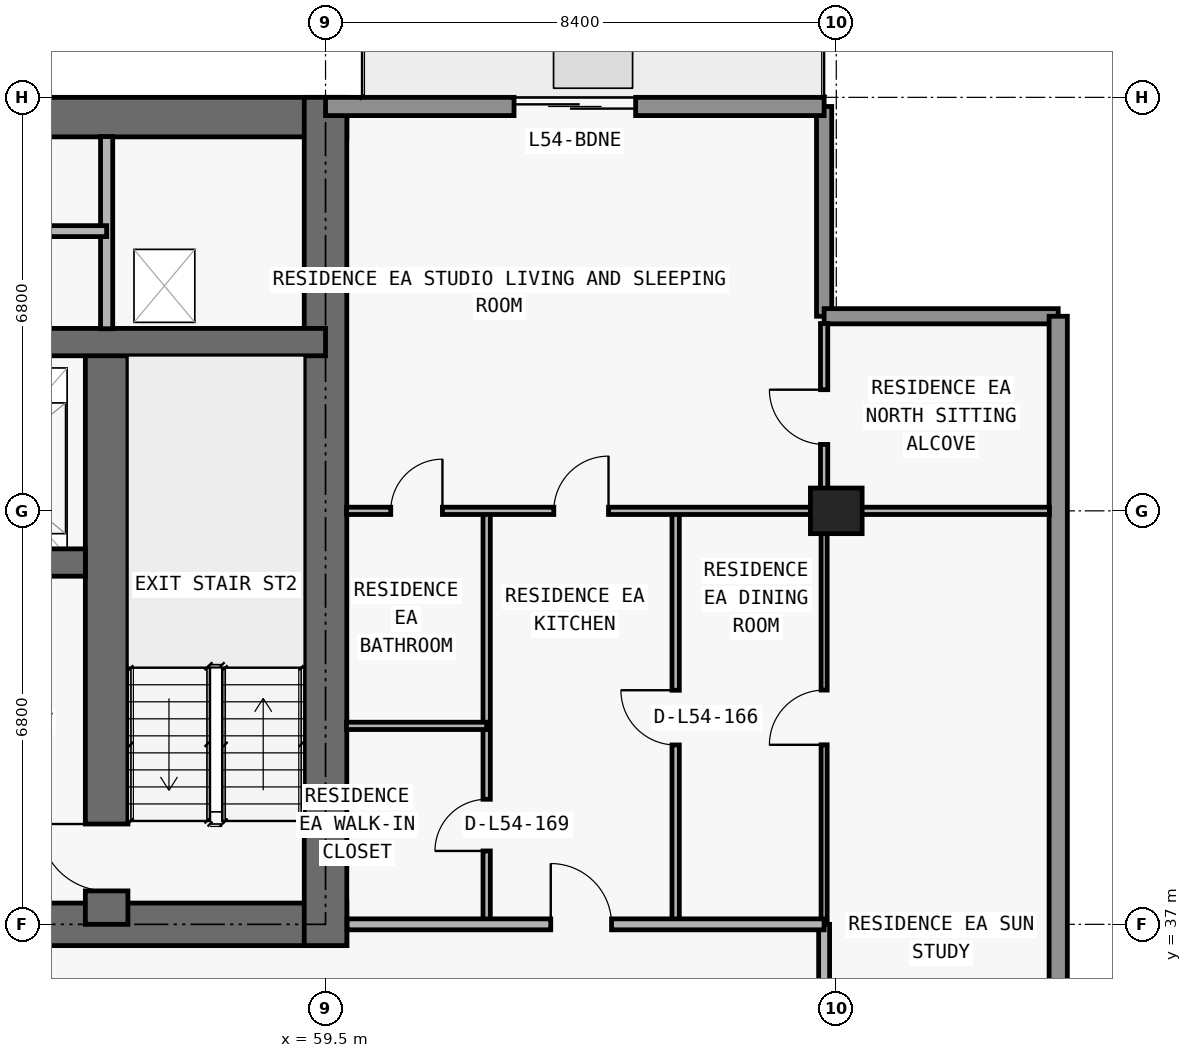
"""IFC4 building model, lengths in metres.
Left out: names, types, materials, properties, quantities, classifications, styles, units other than length and angle.
Written with IfcOpenShell. Run it as: python <this file> out.ifc"""

import sys

from ifc_helpers import new_model, si_unit, direction, frame, frame_2d, origin, origin_2d, place, context, subcontext, project, spatial, rectangle, extrude, element, fill, save


model = new_model("IFC4")
c1 = context("Model", 3, precision=1e-05, world=origin(), true_north=direction((0.0, 1.0)))
c2 = subcontext(c1, "Body", "Model", "MODEL_VIEW")
j1 = project(units=[si_unit("LENGTHUNIT", "METRE"), si_unit("PLANEANGLEUNIT", "RADIAN")], contexts=[c1])
p1 = place(None, origin())
s1 = spatial("IfcSite", under=j1, at=p1, CompositionType="ELEMENT")
p2 = place(p1, origin())
s2 = spatial("IfcBuilding", under=s1, at=p2, CompositionType="ELEMENT")
p3 = place(p2, frame((0.0, 0.0, 195.0)))
s3 = spatial("IfcBuildingStorey", under=s2, at=p3, CompositionType="ELEMENT", Elevation=195.0)
p4 = place(p3, frame((67.9, 43.8, 0.0), z_axis=(0.0, 0.0, 1.0), x_axis=(1.0, 0.0, 0.0)))
e1 = element("IfcColumn", 1, at=p4, inside=s3, PredefinedType="COLUMN", context=c2, shape_type="SweptSolid", body=[
    extrude(rectangle(XDim=0.85, YDim=0.75, at=origin_2d()), origin(), (0.0, 0.0, 1.0), 3.05),
])
p5 = place(p3, frame((17.95, 37.0, 0.0), z_axis=(0.0, 0.0, 1.0), x_axis=(1.0, 0.0, 0.0)))
e2 = element("IfcWall", 2, at=p5, inside=s3, PredefinedType="SHEAR", context=c2, shape_type="SweptSolid", body=[
    extrude(rectangle(XDim=41.9, YDim=0.7, at=frame_2d((20.95, 0.0))), origin(), (0.0, 0.0, 1.0), 3.05),
])
p6 = place(p5, frame((14.35, 0.0, 0.0)))
e3 = element("IfcOpeningElement", 3, at=p6, cuts=e2, PredefinedType="OPENING", context=c2, shape_type="SweptSolid", body=[
    extrude(rectangle(XDim=1.1, YDim=2.15, at=frame_2d((0.55, 1.075))), frame((0.0, 0.36, 0.0), z_axis=(0.0, -1.0, 0.0), x_axis=(1.0, 0.0, 0.0)), (0.0, 0.0, 1.0), 0.72),
])
p7 = place(p5, frame((6.2, 0.0, 0.0)))
e4 = element("IfcOpeningElement", 4, at=p7, cuts=e2, PredefinedType="OPENING", context=c2, shape_type="SweptSolid", body=[
    extrude(rectangle(XDim=1.05, YDim=2.15, at=frame_2d((0.525, 1.075))), frame((0.0, 0.36, 0.0), z_axis=(0.0, -1.0, 0.0), x_axis=(1.0, 0.0, 0.0)), (0.0, 0.0, 1.0), 0.72),
])
p8 = place(p5, frame((34.7, 0.0, 0.0)))
e5 = element("IfcOpeningElement", 5, at=p8, cuts=e2, PredefinedType="OPENING", context=c2, shape_type="SweptSolid", body=[
    extrude(rectangle(XDim=1.05, YDim=2.15, at=frame_2d((0.525, 1.075))), frame((0.0, 0.36, 0.0), z_axis=(0.0, -1.0, 0.0), x_axis=(1.0, 0.0, 0.0)), (0.0, 0.0, 1.0), 0.72),
])
p9 = place(p5, frame((10.812, 0.0, 0.0)))
e6 = element("IfcOpeningElement", 6, at=p9, cuts=e2, PredefinedType="OPENING", context=c2, shape_type="SweptSolid", body=[
    extrude(rectangle(XDim=1.05, YDim=2.15, at=frame_2d((0.525, 1.075))), frame((0.0, 0.36, 0.0), z_axis=(0.0, -1.0, 0.0), x_axis=(1.0, 0.0, 0.0)), (0.0, 0.0, 1.0), 0.72),
])
p10 = place(p5, frame((24.05, 0.0, 0.0)))
e7 = element("IfcOpeningElement", 7, at=p10, cuts=e2, PredefinedType="OPENING", context=c2, shape_type="SweptSolid", body=[
    extrude(rectangle(XDim=1.05, YDim=2.15, at=frame_2d((0.525, 1.075))), frame((0.0, 0.36, 0.0), z_axis=(0.0, -1.0, 0.0), x_axis=(1.0, 0.0, 0.0)), (0.0, 0.0, 1.0), 0.72),
])
p11 = place(p3, frame((17.95, 50.275, 0.0), z_axis=(0.0, 0.0, 1.0), x_axis=(1.0, 0.0, 0.0)))
e8 = element("IfcWall", 8, at=p11, inside=s3, PredefinedType="SHEAR", context=c2, shape_type="SweptSolid", body=[
    extrude(rectangle(XDim=41.9, YDim=0.65, at=frame_2d((20.95, 0.0))), origin(), (0.0, 0.0, 1.0), 3.05),
])
p12 = place(p3, frame((59.5, 36.65, 0.0), z_axis=(0.0, 0.0, 1.0), x_axis=(0.0, 1.0, 0.0)))
e9 = element("IfcWall", 9, at=p12, inside=s3, PredefinedType="SHEAR", context=c2, shape_type="SweptSolid", body=[
    extrude(rectangle(XDim=13.95, YDim=0.7, at=frame_2d((6.975, 0.0))), origin(), (0.0, 0.0, 1.0), 3.05),
])
p13 = place(p3, frame((55.9, 37.0, 0.0), z_axis=(0.0, 0.0, 1.0), x_axis=(0.0, 1.0, 0.0)))
e10 = element("IfcWall", 10, at=p13, inside=s3, PredefinedType="SHEAR", context=c2, shape_type="SweptSolid", body=[
    extrude(rectangle(XDim=9.575, YDim=0.7, at=frame_2d((4.788, 0.0))), origin(), (0.0, 0.0, 1.0), 3.05),
])
p14 = place(p13, frame((0.55, 0.0, 0.0)))
e11 = element("IfcOpeningElement", 11, at=p14, cuts=e10, PredefinedType="OPENING", context=c2, shape_type="SweptSolid", body=[
    extrude(rectangle(XDim=1.1, YDim=2.15, at=frame_2d((0.55, 1.075))), frame((0.0, 0.36, 0.0), z_axis=(0.0, -1.0, 0.0), x_axis=(1.0, 0.0, 0.0)), (0.0, 0.0, 1.0), 0.72),
])
p15 = place(p3, frame((22.25, 42.95, 0.0), z_axis=(0.0, 0.0, 1.0), x_axis=(1.0, 0.0, 0.0)))
e12 = element("IfcWall", 12, at=p15, inside=s3, PredefinedType="SHEAR", context=c2, shape_type="SweptSolid", body=[
    extrude(rectangle(XDim=33.3, YDim=0.45, at=frame_2d((16.65, 0.0))), origin(), (0.0, 0.0, 1.0), 3.05),
])
p16 = place(p15, frame((1.05, 0.0, 0.0)))
e13 = element("IfcOpeningElement", 13, at=p16, cuts=e12, PredefinedType="OPENING", context=c2, shape_type="SweptSolid", body=[
    extrude(rectangle(XDim=1.2, YDim=2.2, at=frame_2d((0.6, 1.1))), frame((0.0, 0.235, 0.0), z_axis=(0.0, -1.0, 0.0), x_axis=(1.0, 0.0, 0.0)), (0.0, 0.0, 1.0), 0.47),
])
p17 = place(p15, frame((31.05, 0.0, 0.0)))
e14 = element("IfcOpeningElement", 14, at=p17, cuts=e12, PredefinedType="OPENING", context=c2, shape_type="SweptSolid", body=[
    extrude(rectangle(XDim=1.2, YDim=2.2, at=frame_2d((0.6, 1.1))), frame((0.0, 0.235, 0.0), z_axis=(0.0, -1.0, 0.0), x_axis=(1.0, 0.0, 0.0)), (0.0, 0.0, 1.0), 0.47),
])
p18 = place(p15, frame((26.45, 0.0, 0.0)))
e15 = element("IfcOpeningElement", 15, at=p18, cuts=e12, PredefinedType="OPENING", context=c2, shape_type="SweptSolid", body=[
    extrude(rectangle(XDim=1.1, YDim=2.2, at=frame_2d((0.55, 1.1))), frame((0.0, 0.235, 0.0), z_axis=(0.0, -1.0, 0.0), x_axis=(1.0, 0.0, 0.0)), (0.0, 0.0, 1.0), 0.47),
])
p19 = place(p15, frame((5.95, 0.0, 0.0)))
e16 = element("IfcOpeningElement", 16, at=p19, cuts=e12, PredefinedType="OPENING", context=c2, shape_type="SweptSolid", body=[
    extrude(rectangle(XDim=1.1, YDim=2.2, at=frame_2d((0.55, 1.1))), frame((0.0, 0.235, 0.0), z_axis=(0.0, -1.0, 0.0), x_axis=(1.0, 0.0, 0.0)), (0.0, 0.0, 1.0), 0.47),
])
p20 = place(p15, frame((3.625, 0.0, 0.0)))
e17 = element("IfcOpeningElement", 17, at=p20, cuts=e12, PredefinedType="OPENING", context=c2, shape_type="SweptSolid", body=[
    extrude(rectangle(XDim=1.05, YDim=2.15, at=frame_2d((0.525, 1.075))), frame((0.0, 0.235, 0.0), z_axis=(0.0, -1.0, 0.0), x_axis=(1.0, 0.0, 0.0)), (0.0, 0.0, 1.0), 0.47),
])
p21 = place(p15, frame((28.675, 0.0, 0.0)))
e18 = element("IfcOpeningElement", 18, at=p21, cuts=e12, PredefinedType="OPENING", context=c2, shape_type="SweptSolid", body=[
    extrude(rectangle(XDim=1.05, YDim=2.15, at=frame_2d((0.525, 1.075))), frame((0.0, 0.235, 0.0), z_axis=(0.0, -1.0, 0.0), x_axis=(1.0, 0.0, 0.0)), (0.0, 0.0, 1.0), 0.47),
])
p22 = place(p15, frame((15.225, 0.0, 0.0)))
e19 = element("IfcOpeningElement", 19, at=p22, cuts=e12, PredefinedType="OPENING", context=c2, shape_type="SweptSolid", body=[
    extrude(rectangle(XDim=1.0, YDim=2.2, at=frame_2d((0.5, 1.1))), frame((0.0, 0.235, 0.0), z_axis=(0.0, -1.0, 0.0), x_axis=(1.0, 0.0, 0.0)), (0.0, 0.0, 1.0), 0.47),
])
p23 = place(p15, frame((21.975, 0.0, 0.0)))
e20 = element("IfcOpeningElement", 20, at=p23, cuts=e12, PredefinedType="OPENING", context=c2, shape_type="SweptSolid", body=[
    extrude(rectangle(XDim=1.0, YDim=2.2, at=frame_2d((0.5, 1.1))), frame((0.0, 0.235, 0.0), z_axis=(0.0, -1.0, 0.0), x_axis=(1.0, 0.0, 0.0)), (0.0, 0.0, 1.0), 0.47),
])
p24 = place(p3, frame((18.3, 46.575, 0.0), z_axis=(0.0, 0.0, 1.0), x_axis=(1.0, 0.0, 0.0)))
e21 = element("IfcWall", 21, at=p24, inside=s3, PredefinedType="SHEAR", context=c2, shape_type="SweptSolid", body=[
    extrude(rectangle(XDim=41.2, YDim=0.45, at=frame_2d((20.6, 0.0))), origin(), (0.0, 0.0, 1.0), 3.05),
])
p25 = place(p24, frame((7.575, 0.0, 0.0)))
e22 = element("IfcOpeningElement", 22, at=p25, cuts=e21, PredefinedType="OPENING", context=c2, shape_type="SweptSolid", body=[
    extrude(rectangle(XDim=1.05, YDim=2.15, at=frame_2d((0.525, 1.075))), frame((0.0, 0.235, 0.0), z_axis=(0.0, -1.0, 0.0), x_axis=(1.0, 0.0, 0.0)), (0.0, 0.0, 1.0), 0.47),
])
p26 = place(p24, frame((32.625, 0.0, 0.0)))
e23 = element("IfcOpeningElement", 23, at=p26, cuts=e21, PredefinedType="OPENING", context=c2, shape_type="SweptSolid", body=[
    extrude(rectangle(XDim=1.05, YDim=2.15, at=frame_2d((0.525, 1.075))), frame((0.0, 0.235, 0.0), z_axis=(0.0, -1.0, 0.0), x_axis=(1.0, 0.0, 0.0)), (0.0, 0.0, 1.0), 0.47),
])
p27 = place(p3, frame((67.7, 50.45, 0.0), z_axis=(0.0, 0.0, 1.0), x_axis=(0.0, -1.0, 0.0)))
e24 = element("IfcWall", 24, at=p27, inside=s3, PredefinedType="ELEMENTEDWALL", context=c2, shape_type="SweptSolid", body=[
    extrude(rectangle(XDim=3.45, YDim=0.25, at=frame_2d((1.725, 0.0))), origin(), (0.0, 0.0, 1.0), 3.05),
])
p28 = place(p3, frame((67.7, 47.0, 0.0), z_axis=(0.0, 0.0, 1.0), x_axis=(1.0, 0.0, 0.0)))
e25 = element("IfcWall", 25, at=p28, inside=s3, PredefinedType="ELEMENTEDWALL", context=c2, shape_type="SweptSolid", body=[
    extrude(rectangle(XDim=3.85, YDim=0.25, at=frame_2d((1.925, 0.0))), origin(), (0.0, 0.0, 1.0), 3.05),
])
p29 = place(p3, frame((71.55, 47.0, 0.0), z_axis=(0.0, 0.0, 1.0), x_axis=(0.0, -1.0, 0.0)))
e26 = element("IfcWall", 26, at=p29, inside=s3, PredefinedType="STANDARD", context=c2, shape_type="SweptSolid", body=[
    extrude(rectangle(XDim=17.9, YDim=0.3, at=frame_2d((8.95, 0.0))), origin(), (0.0, 0.0, 1.0), 3.05),
])
p30 = place(p3, frame((59.5, 50.45, 0.0), z_axis=(0.0, 0.0, 1.0), x_axis=(1.0, 0.0, 0.0)))
e27 = element("IfcWall", 27, at=p30, inside=s3, PredefinedType="STANDARD", context=c2, shape_type="SweptSolid", body=[
    extrude(rectangle(XDim=8.2, YDim=0.3, at=frame_2d((4.1, 0.0))), origin(), (0.0, 0.0, 1.0), 3.05),
])
p31 = place(p30, frame((3.1, 0.0, 0.0)))
e28 = element("IfcOpeningElement", 28, at=p31, cuts=e27, PredefinedType="OPENING", context=c2, shape_type="SweptSolid", body=[
    extrude(rectangle(XDim=2.0, YDim=2.3, at=frame_2d((1.0, 1.15))), frame((0.0, 0.16, 0.0), z_axis=(0.0, -1.0, 0.0), x_axis=(1.0, 0.0, 0.0)), (0.0, 0.0, 1.0), 0.32),
])
p32 = place(p3, frame((55.9, 46.795, 0.0), z_axis=(0.0, 0.0, 1.0), x_axis=(0.0, 1.0, 0.0)))
e29 = element("IfcWall", 29, at=p32, inside=s3, PredefinedType="PARTITIONING", context=c2, shape_type="SweptSolid", body=[
    extrude(rectangle(XDim=3.16, YDim=0.2, at=frame_2d((1.58, 0.0))), origin(), (0.0, 0.0, 1.0), 3.05),
])
p33 = place(p3, frame((62.15, 37.0, 0.0), z_axis=(0.0, 0.0, 1.0), x_axis=(0.0, 1.0, 0.0)))
e30 = element("IfcWall", 30, at=p33, inside=s3, PredefinedType="PARTITIONING", context=c2, shape_type="SweptSolid", body=[
    extrude(rectangle(XDim=6.8, YDim=0.12, at=frame_2d((3.4, 0.0))), origin(), (0.0, 0.0, 1.0), 3.05),
])
p34 = place(p33, frame((1.207, 0.0, 0.0)))
e31 = element("IfcOpeningElement", 31, at=p34, cuts=e30, PredefinedType="OPENING", context=c2, shape_type="SweptSolid", body=[
    extrude(rectangle(XDim=0.85, YDim=2.1, at=frame_2d((0.425, 1.05))), frame((0.0, 0.07, 0.0), z_axis=(0.0, -1.0, 0.0), x_axis=(1.0, 0.0, 0.0)), (0.0, 0.0, 1.0), 0.14),
])
p35 = place(p3, frame((65.258, 37.0, 0.0), z_axis=(0.0, 0.0, 1.0), x_axis=(0.0, 1.0, 0.0)))
e32 = element("IfcWall", 32, at=p35, inside=s3, PredefinedType="PARTITIONING", context=c2, shape_type="SweptSolid", body=[
    extrude(rectangle(XDim=6.8, YDim=0.12, at=frame_2d((3.4, 0.0))), origin(), (0.0, 0.0, 1.0), 3.05),
])
p36 = place(p35, frame((2.95, 0.0, 0.0)))
e33 = element("IfcOpeningElement", 33, at=p36, cuts=e32, PredefinedType="OPENING", context=c2, shape_type="SweptSolid", body=[
    extrude(rectangle(XDim=0.9, YDim=2.15, at=frame_2d((0.45, 1.075))), frame((0.0, 0.07, 0.0), z_axis=(0.0, -1.0, 0.0), x_axis=(1.0, 0.0, 0.0)), (0.0, 0.0, 1.0), 0.14),
])
p37 = place(p3, frame((67.7, 33.505, 0.0), z_axis=(0.0, 0.0, 1.0), x_axis=(0.0, 1.0, 0.0)))
e34 = element("IfcWall", 34, at=p37, inside=s3, PredefinedType="PARTITIONING", context=c2, shape_type="SweptSolid", body=[
    extrude(rectangle(XDim=3.495, YDim=0.18, at=frame_2d((1.748, 0.0))), origin(), (0.0, 0.0, 1.0), 2.263),
])
p38 = place(p3, frame((67.7, 37.005, 0.0), z_axis=(0.0, 0.0, 1.0), x_axis=(0.0, 1.0, 0.0)))
e35 = element("IfcWall", 35, at=p38, inside=s3, PredefinedType="MOVABLE", context=c2, shape_type="SweptSolid", body=[
    extrude(rectangle(XDim=6.795, YDim=0.1, at=frame_2d((3.397, 0.0))), origin(), (0.0, 0.0, 1.0), 2.263),
])
p39 = place(p38, frame((2.948, 0.0, 0.0)))
e36 = element("IfcOpeningElement", 36, at=p39, cuts=e35, PredefinedType="OPENING", context=c2, shape_type="SweptSolid", body=[
    extrude(rectangle(XDim=0.9, YDim=2.15, at=frame_2d((0.45, 1.075))), frame((0.0, 0.06, 0.0), z_axis=(0.0, -1.0, 0.0), x_axis=(1.0, 0.0, 0.0)), (0.0, 0.0, 1.0), 0.12),
])
p40 = place(p3, frame((67.7, 43.805, 0.0), z_axis=(0.0, 0.0, 1.0), x_axis=(0.0, 1.0, 0.0)))
e37 = element("IfcWall", 37, at=p40, inside=s3, PredefinedType="PARTITIONING", context=c2, shape_type="SweptSolid", body=[
    extrude(rectangle(XDim=3.075, YDim=0.12, at=frame_2d((1.538, 0.0))), origin(), (0.0, 0.0, 1.0), 3.05),
])
p41 = place(p40, frame((1.087, 0.0, 0.0)))
e38 = element("IfcOpeningElement", 38, at=p41, cuts=e37, PredefinedType="OPENING", context=c2, shape_type="SweptSolid", body=[
    extrude(rectangle(XDim=0.9, YDim=2.15, at=frame_2d((0.45, 1.075))), frame((0.0, 0.07, 0.0), z_axis=(0.0, -1.0, 0.0), x_axis=(1.0, 0.0, 0.0)), (0.0, 0.0, 1.0), 0.14),
])
p42 = place(p3, frame((59.855, 37.0, 0.0), z_axis=(0.0, 0.0, 1.0), x_axis=(1.0, 0.0, 0.0)))
e39 = element("IfcWall", 39, at=p42, inside=s3, PredefinedType="PARTITIONING", context=c2, shape_type="SweptSolid", body=[
    extrude(rectangle(XDim=7.845, YDim=0.18, at=frame_2d((3.922, 0.0))), origin(), (0.0, 0.0, 1.0), 3.05),
])
p43 = place(p42, frame((3.349, 0.0, 0.0)))
e40 = element("IfcOpeningElement", 40, at=p43, cuts=e39, PredefinedType="OPENING", context=c2, shape_type="SweptSolid", body=[
    extrude(rectangle(XDim=1.0, YDim=2.2, at=frame_2d((0.5, 1.1))), frame((0.0, 0.1, 0.0), z_axis=(0.0, -1.0, 0.0), x_axis=(1.0, 0.0, 0.0)), (0.0, 0.0, 1.0), 0.2),
])
p44 = place(p3, frame((59.845, 40.264, 0.0), z_axis=(0.0, 0.0, 1.0), x_axis=(1.0, 0.0, 0.0)))
e41 = element("IfcWall", 41, at=p44, inside=s3, PredefinedType="PARTITIONING", context=c2, shape_type="SweptSolid", body=[
    extrude(rectangle(XDim=2.305, YDim=0.12, at=frame_2d((1.152, 0.0))), origin(), (0.0, 0.0, 1.0), 3.05),
])
p45 = place(p3, frame((59.845, 43.8, 0.0), z_axis=(0.0, 0.0, 1.0), x_axis=(1.0, 0.0, 0.0)))
e42 = element("IfcWall", 42, at=p45, inside=s3, PredefinedType="PARTITIONING", context=c2, shape_type="SweptSolid", body=[
    extrude(rectangle(XDim=11.56, YDim=0.12, at=frame_2d((5.78, 0.0))), origin(), (0.0, 0.0, 1.0), 2.418),
])
p46 = place(p45, frame((3.409, 0.0, 0.0)))
e43 = element("IfcOpeningElement", 43, at=p46, cuts=e42, PredefinedType="OPENING", context=c2, shape_type="SweptSolid", body=[
    extrude(rectangle(XDim=0.9, YDim=2.15, at=frame_2d((0.45, 1.075))), frame((0.0, 0.07, 0.0), z_axis=(0.0, -1.0, 0.0), x_axis=(1.0, 0.0, 0.0)), (0.0, 0.0, 1.0), 0.14),
])
p47 = place(p45, frame((0.728, 0.0, 0.0)))
e44 = element("IfcOpeningElement", 44, at=p47, cuts=e42, PredefinedType="OPENING", context=c2, shape_type="SweptSolid", body=[
    extrude(rectangle(XDim=0.85, YDim=2.1, at=frame_2d((0.425, 1.05))), frame((0.0, 0.07, 0.0), z_axis=(0.0, -1.0, 0.0), x_axis=(1.0, 0.0, 0.0)), (0.0, 0.0, 1.0), 0.14),
])
p48 = place(p3, frame((21.9, 48.4, 0.0), z_axis=(0.0, 0.0, 1.0), x_axis=(1.0, 0.0, 0.0)))
e45 = element("IfcWall", 45, at=p48, inside=s3, PredefinedType="PARTITIONING", context=c2, shape_type="SweptSolid", body=[
    extrude(rectangle(XDim=34.0, YDim=0.18, at=frame_2d((17.0, 0.0))), origin(), (0.0, 0.0, 1.0), 3.05),
])
p49 = place(p48, frame((8.0, 0.0, 0.0)))
e46 = element("IfcOpeningElement", 46, at=p49, cuts=e45, PredefinedType="OPENING", context=c2, shape_type="SweptSolid", body=[
    extrude(rectangle(XDim=1.0, YDim=2.2, at=frame_2d((0.5, 1.1))), frame((0.0, 0.1, 0.0), z_axis=(0.0, -1.0, 0.0), x_axis=(1.0, 0.0, 0.0)), (0.0, 0.0, 1.0), 0.2),
])
p50 = place(p48, frame((25.0, 0.0, 0.0)))
e47 = element("IfcOpeningElement", 47, at=p50, cuts=e45, PredefinedType="OPENING", context=c2, shape_type="SweptSolid", body=[
    extrude(rectangle(XDim=1.0, YDim=2.2, at=frame_2d((0.5, 1.1))), frame((0.0, 0.1, 0.0), z_axis=(0.0, -1.0, 0.0), x_axis=(1.0, 0.0, 0.0)), (0.0, 0.0, 1.0), 0.2),
])
p51 = place(p31, origin())
e48 = element("IfcDoor", 48, at=p51, inside=s3, OperationType="DOUBLE_DOOR_SLIDING", PredefinedType="DOOR", context=c2, shape_type="SweptSolid", body=[
    extrude(rectangle(XDim=2.0, YDim=2.3, at=frame_2d((1.0, 1.15))), frame((0.0, 0.025, 0.0), z_axis=(0.0, -1.0, 0.0), x_axis=(1.0, 0.0, 0.0)), (0.0, 0.0, 1.0), 0.05),
])
fill(e28, e48)
p52 = place(p14, origin())
e49 = element("IfcDoor", 49, at=p52, inside=s3, OperationType="SINGLE_SWING_RIGHT", PredefinedType="DOOR", context=c2, shape_type="SweptSolid", body=[
    extrude(rectangle(XDim=1.1, YDim=2.15, at=frame_2d((0.55, 1.075))), frame((0.0, 0.025, 0.0), z_axis=(0.0, -1.0, 0.0), x_axis=(1.0, 0.0, 0.0)), (0.0, 0.0, 1.0), 0.05),
])
fill(e11, e49)
p53 = place(p36, origin())
e50 = element("IfcDoor", 50, at=p53, inside=s3, OperationType="SINGLE_SWING_RIGHT", PredefinedType="DOOR", context=c2, shape_type="SweptSolid", body=[
    extrude(rectangle(XDim=0.9, YDim=2.15, at=frame_2d((0.45, 1.075))), frame((0.0, 0.025, 0.0), z_axis=(0.0, -1.0, 0.0), x_axis=(1.0, 0.0, 0.0)), (0.0, 0.0, 1.0), 0.05),
])
fill(e33, e50)
p54 = place(p43, origin())
e51 = element("IfcDoor", 51, at=p54, inside=s3, OperationType="SINGLE_SWING_LEFT", PredefinedType="DOOR", context=c2, shape_type="SweptSolid", body=[
    extrude(rectangle(XDim=1.0, YDim=2.2, at=frame_2d((0.5, 1.1))), frame((0.0, 0.025, 0.0), z_axis=(0.0, -1.0, 0.0), x_axis=(1.0, 0.0, 0.0)), (0.0, 0.0, 1.0), 0.05),
])
fill(e40, e51)
p55 = place(p46, origin())
e52 = element("IfcDoor", 52, at=p55, inside=s3, OperationType="SINGLE_SWING_RIGHT", PredefinedType="DOOR", context=c2, shape_type="SweptSolid", body=[
    extrude(rectangle(XDim=0.9, YDim=2.15, at=frame_2d((0.45, 1.075))), frame((0.0, 0.025, 0.0), z_axis=(0.0, -1.0, 0.0), x_axis=(1.0, 0.0, 0.0)), (0.0, 0.0, 1.0), 0.05),
])
fill(e43, e52)
p56 = place(p34, origin())
e53 = element("IfcDoor", 53, at=p56, inside=s3, OperationType="SINGLE_SWING_LEFT", PredefinedType="DOOR", context=c2, shape_type="SweptSolid", body=[
    extrude(rectangle(XDim=0.85, YDim=2.1, at=frame_2d((0.425, 1.05))), frame((0.0, 0.025, 0.0), z_axis=(0.0, -1.0, 0.0), x_axis=(1.0, 0.0, 0.0)), (0.0, 0.0, 1.0), 0.05),
])
fill(e31, e53)
p57 = place(p47, origin())
e54 = element("IfcDoor", 54, at=p57, inside=s3, OperationType="SINGLE_SWING_RIGHT", PredefinedType="DOOR", context=c2, shape_type="SweptSolid", body=[
    extrude(rectangle(XDim=0.85, YDim=2.1, at=frame_2d((0.425, 1.05))), frame((0.0, 0.025, 0.0), z_axis=(0.0, -1.0, 0.0), x_axis=(1.0, 0.0, 0.0)), (0.0, 0.0, 1.0), 0.05),
])
fill(e44, e54)
p58 = place(p39, origin())
e55 = element("IfcDoor", 55, at=p58, inside=s3, OperationType="SINGLE_SWING_LEFT", PredefinedType="DOOR", context=c2, shape_type="SweptSolid", body=[
    extrude(rectangle(XDim=0.9, YDim=2.15, at=frame_2d((0.45, 1.075))), frame((0.0, 0.025, 0.0), z_axis=(0.0, -1.0, 0.0), x_axis=(1.0, 0.0, 0.0)), (0.0, 0.0, 1.0), 0.05),
])
fill(e36, e55)
p59 = place(p41, origin())
e56 = element("IfcDoor", 56, at=p59, inside=s3, OperationType="SINGLE_SWING_RIGHT", PredefinedType="DOOR", context=c2, shape_type="SweptSolid", body=[
    extrude(rectangle(XDim=0.9, YDim=2.15, at=frame_2d((0.45, 1.075))), frame((0.0, 0.025, 0.0), z_axis=(0.0, -1.0, 0.0), x_axis=(1.0, 0.0, 0.0)), (0.0, 0.0, 1.0), 0.05),
])
fill(e38, e56)
save(model, sys.argv[1])
